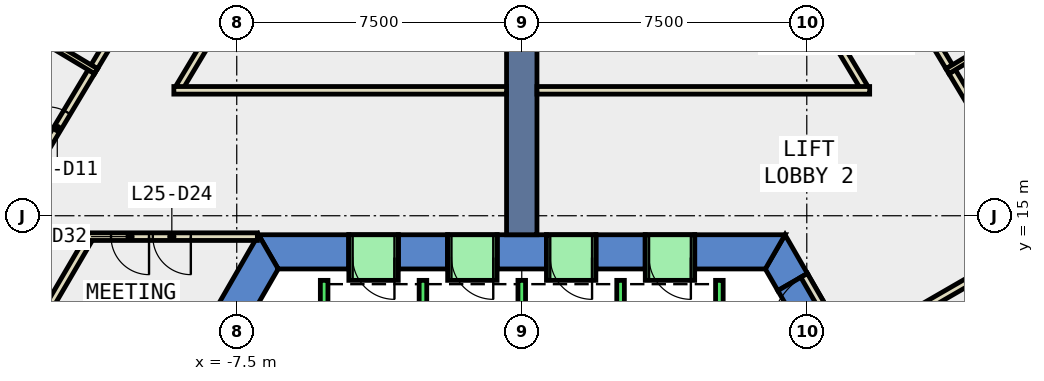
"""IFC4 building model, lengths in metres.
Left out: names, types, materials, properties, quantities, classifications, styles, units other than length and angle.
Written with IfcOpenShell. Run it as: python <this file> out.ifc"""

import sys

from ifc_helpers import new_model, si_unit, direction, frame, frame_2d, origin, place, context, subcontext, project, spatial, polyline, rectangle, outline, extrude, element, fill, save


model = new_model("IFC4")
c1 = context("Model", 3, precision=1e-05, world=origin(), true_north=direction((0.0, 1.0)))
c2 = subcontext(c1, "Body", "Model", "MODEL_VIEW")
j1 = project(units=[si_unit("LENGTHUNIT", "METRE"), si_unit("PLANEANGLEUNIT", "RADIAN")], contexts=[c1])
p1 = place(None, origin())
s1 = spatial("IfcSite", under=j1, at=p1, CompositionType="ELEMENT")
p2 = place(p1, origin())
s2 = spatial("IfcBuilding", under=s1, at=p2, CompositionType="ELEMENT")
p3 = place(p2, frame((0.0, 0.0, 116.0)))
s3 = spatial("IfcBuildingStorey", under=s2, at=p3, CompositionType="ELEMENT", Elevation=116.0)
p4 = place(p3, frame((0.0, 0.0, -0.4)))
e1 = element("IfcWall", 1, at=p4, inside=s3, PredefinedType="SHEAR", context=c2, shape_type="SweptSolid", body=[
    extrude(outline(polyline([(6.738, 13.03), (7.517, 13.48), (6.928, 14.5), (6.409, 13.6), (6.738, 13.03)])), origin(), (0.0, 0.0, 1.0), 4.2),
])
p5 = place(p3, frame((0.0, 0.0, 3.6)))
e2 = element("IfcWall", 2, at=p5, inside=s3, PredefinedType="SHEAR", context=c2, shape_type="SweptSolid", body=[
    extrude(outline(polyline([(7.517, 13.48), (6.738, 13.03), (7.738, 11.298), (8.517, 11.748), (7.517, 13.48)])), origin(), (0.0, 0.0, 1.0), 0.2),
])
p6 = place(p3, frame((0.0, 0.0, -0.4)))
e3 = element("IfcWall", 3, at=p6, inside=s3, PredefinedType="SHEAR", context=c2, shape_type="SweptSolid", body=[
    extrude(outline(polyline([(4.55, 14.5), (4.55, 13.6), (6.409, 13.6), (6.928, 14.5), (4.55, 14.5)])), origin(), (0.0, 0.0, 1.0), 4.2),
])
p7 = place(p3, frame((0.0, 0.0, -0.4)))
e4 = element("IfcWall", 4, at=p7, inside=s3, PredefinedType="SHEAR", context=c2, shape_type="SweptSolid", body=[
    extrude(outline(polyline([(1.95, 14.5), (1.95, 13.6), (3.25, 13.6), (3.25, 14.5), (1.95, 14.5)])), origin(), (0.0, 0.0, 1.0), 4.2),
])
p8 = place(p3, frame((0.0, 0.0, -0.4)))
e5 = element("IfcWall", 5, at=p8, inside=s3, PredefinedType="SHEAR", context=c2, shape_type="SweptSolid", body=[
    extrude(outline(polyline([(-0.65, 14.5), (-0.65, 13.6), (0.65, 13.6), (0.65, 14.5), (-0.65, 14.5)])), origin(), (0.0, 0.0, 1.0), 4.2),
])
p9 = place(p3, frame((0.0, 0.0, -0.4)))
e6 = element("IfcWall", 6, at=p9, inside=s3, PredefinedType="SHEAR", context=c2, shape_type="SweptSolid", body=[
    extrude(outline(polyline([(-3.25, 14.5), (-3.25, 13.6), (-1.95, 13.6), (-1.95, 14.5), (-3.25, 14.5)])), origin(), (0.0, 0.0, 1.0), 4.2),
])
p10 = place(p3, frame((0.0, 0.0, -0.4)))
e7 = element("IfcWall", 7, at=p10, inside=s3, PredefinedType="SHEAR", context=c2, shape_type="SweptSolid", body=[
    extrude(outline(polyline([(-4.55, 13.6), (-4.55, 14.5), (-6.928, 14.5), (-6.409, 13.6), (-4.55, 13.6)])), origin(), (0.0, 0.0, 1.0), 4.2),
])
p11 = place(p3, frame((0.0, 0.0, 3.6)))
e8 = element("IfcWall", 8, at=p11, inside=s3, PredefinedType="SHEAR", context=c2, shape_type="SweptSolid", body=[
    extrude(outline(polyline([(3.25, 14.5), (3.25, 13.6), (4.55, 13.6), (4.55, 14.5), (3.25, 14.5)])), origin(), (0.0, 0.0, 1.0), 0.2),
])
p12 = place(p3, frame((0.0, 0.0, 3.6)))
e9 = element("IfcWall", 9, at=p12, inside=s3, PredefinedType="SHEAR", context=c2, shape_type="SweptSolid", body=[
    extrude(outline(polyline([(0.65, 14.5), (0.65, 13.6), (1.95, 13.6), (1.95, 14.5), (0.65, 14.5)])), origin(), (0.0, 0.0, 1.0), 0.2),
])
p13 = place(p3, frame((0.0, 0.0, 3.6)))
e10 = element("IfcWall", 10, at=p13, inside=s3, PredefinedType="SHEAR", context=c2, shape_type="SweptSolid", body=[
    extrude(outline(polyline([(-1.95, 14.5), (-1.95, 13.6), (-0.65, 13.6), (-0.65, 14.5), (-1.95, 14.5)])), origin(), (0.0, 0.0, 1.0), 0.2),
])
p14 = place(p3, frame((0.0, 0.0, 3.6)))
e11 = element("IfcWall", 11, at=p14, inside=s3, PredefinedType="SHEAR", context=c2, shape_type="SweptSolid", body=[
    extrude(outline(polyline([(-4.55, 14.5), (-4.55, 13.6), (-3.25, 13.6), (-3.25, 14.5), (-4.55, 14.5)])), origin(), (0.0, 0.0, 1.0), 0.2),
])
p15 = place(p3, frame((0.0, 0.0, -0.4)))
e12 = element("IfcWall", 12, at=p15, inside=s3, PredefinedType="SHEAR", context=c2, shape_type="SweptSolid", body=[
    extrude(outline(polyline([(-12.267, 5.252), (-11.488, 4.802), (-6.409, 13.6), (-6.928, 14.5), (-12.267, 5.252)])), origin(), (0.0, 0.0, 1.0), 4.2),
])
p16 = place(p3, frame((0.0, 14.5, -0.4), z_axis=(0.0, 0.0, 1.0), x_axis=(0.0, 1.0, 0.0)))
e13 = element("IfcWall", 13, at=p16, inside=s3, PredefinedType="SHEAR", context=c2, shape_type="SweptSolid", body=[
    extrude(rectangle(XDim=9.0, YDim=0.8, at=frame_2d((4.5, 0.0))), origin(), (0.0, 0.0, 1.0), 4.2),
])
p17 = place(p3, frame((-11.409, 14.364, 0.0), z_axis=(0.0, 0.0, 1.0), x_axis=(-0.504846343003, -0.863209227219, 0.0)))
e14 = element("IfcWall", 14, at=p17, inside=s3, PredefinedType="PARTITIONING", context=c2, shape_type="SweptSolid", body=[
    extrude(rectangle(XDim=2.785, YDim=0.2, at=frame_2d((1.393, 0.0))), origin(), (0.0, 0.0, 1.0), 3.8),
])
p18 = place(p3, frame((11.888, 13.348, 0.0), z_axis=(0.0, 0.0, 1.0), x_axis=(-0.865959227195, -0.500114603702, 0.0)))
e15 = element("IfcWall", 15, at=p18, inside=s3, PredefinedType="PARTITIONING", context=c2, shape_type="SweptSolid", body=[
    extrude(rectangle(XDim=3.269, YDim=0.2, at=frame_2d((1.635, 0.0))), origin(), (0.0, 0.0, 1.0), 3.8),
])
for number, where, z_axis, x_axis in (
    (16, (9.003, 18.386, 0.0), (0.0, 0.0, 1.0), (-0.514, 0.858, 0.0)),
    (17, (-7.576, 20.768, 0.0), (0.0, 0.0, 1.0), (-0.514, -0.858, 0.0)),
):
    element("IfcWall", number, at=place(p3, frame(where, z_axis=z_axis, x_axis=x_axis)), inside=s3, PredefinedType="PARTITIONING", context=c2, shape_type="SweptSolid", body=[
        extrude(rectangle(XDim=2.777, YDim=0.2, at=frame_2d((1.388, 0.0))), origin(), (0.0, 0.0, 1.0), 3.8),
    ])
p19 = place(p3, frame((11.326, 18.79, 0.0), z_axis=(0.0, 0.0, 1.0), x_axis=(0.514155958966, -0.857696712049, 0.0)))
e18 = element("IfcWall", 18, at=p19, inside=s3, PredefinedType="PARTITIONING", context=c2, shape_type="SweptSolid", body=[
    extrude(rectangle(XDim=3.487, YDim=0.2, at=frame_2d((1.744, 0.0))), origin(), (0.0, 0.0, 1.0), 3.8),
])
for number, where, z_axis, x_axis in (
    (19, (9.457, 21.909, 0.0), (0.0, 0.0, 1.0), (0.514, -0.858, 0.0)),
    (20, (-11.249, 18.918, 0.0), (0.0, 0.0, 1.0), (0.514, 0.858, 0.0)),
):
    element("IfcWall", number, at=place(p3, frame(where, z_axis=z_axis, x_axis=x_axis)), inside=s3, PredefinedType="PARTITIONING", context=c2, shape_type="SweptSolid", body=[
        extrude(rectangle(XDim=3.487, YDim=0.2, at=frame_2d((1.743, 0.0))), origin(), (0.0, 0.0, 1.0), 3.8),
    ])
p20 = place(p3, frame((-13.119, 15.799, 0.0), z_axis=(0.0, 0.0, 1.0), x_axis=(0.514155958966, 0.857696712049, 0.0)))
e21 = element("IfcWall", 21, at=p20, inside=s3, PredefinedType="PARTITIONING", context=c2, shape_type="SweptSolid", body=[
    extrude(rectangle(XDim=3.487, YDim=0.2, at=frame_2d((1.744, 0.0))), origin(), (0.0, 0.0, 1.0), 3.8),
])
p21 = place(p20, frame((1.244, 0.0, 0.0)))
e22 = element("IfcOpeningElement", 22, at=p21, cuts=e21, PredefinedType="OPENING", context=c2, shape_type="SweptSolid", body=[
    extrude(rectangle(XDim=1.0, YDim=2.1, at=frame_2d((0.5, 1.05))), frame((0.0, 0.11, 0.0), z_axis=(0.0, -1.0, 0.0), x_axis=(1.0, 0.0, 0.0)), (0.0, 0.0, 1.0), 0.22),
])
p22 = place(p3, frame((-6.957, 14.45, 0.0), z_axis=(0.0, 0.0, 1.0), x_axis=(-1.0, 0.0, 0.0)))
e23 = element("IfcWall", 23, at=p22, inside=s3, PredefinedType="PARTITIONING", context=c2, shape_type="SweptSolid", body=[
    extrude(rectangle(XDim=4.502, YDim=0.2, at=frame_2d((2.251, 0.0))), origin(), (0.0, 0.0, 1.0), 3.8),
])
p23 = place(p22, frame((1.751, 0.0, 0.0)))
e24 = element("IfcOpeningElement", 24, at=p23, cuts=e23, PredefinedType="OPENING", context=c2, shape_type="SweptSolid", body=[
    extrude(rectangle(XDim=1.0, YDim=2.1, at=frame_2d((0.5, 1.05))), frame((0.0, 0.11, 0.0), z_axis=(0.0, -1.0, 0.0), x_axis=(1.0, 0.0, 0.0)), (0.0, 0.0, 1.0), 0.22),
])
p24 = place(p22, frame((2.851, 0.0, 0.0)))
e25 = element("IfcOpeningElement", 25, at=p24, cuts=e23, PredefinedType="OPENING", context=c2, shape_type="SweptSolid", body=[
    extrude(rectangle(XDim=1.0, YDim=2.1, at=frame_2d((0.5, 1.05))), frame((0.0, 0.11, 0.0), z_axis=(0.0, -1.0, 0.0), x_axis=(1.0, 0.0, 0.0)), (0.0, 0.0, 1.0), 0.22),
])
for number, where, z_axis, x_axis in (
    (26, (0.4, 18.3, 0.0), (0.0, 0.0, 1.0), (1.0, 0.0, 0.0)),
    (27, (-9.155, 18.3, 0.0), (0.0, 0.0, 1.0), (1.0, 0.0, 0.0)),
):
    element("IfcWall", number, at=place(p3, frame(where, z_axis=z_axis, x_axis=x_axis)), inside=s3, PredefinedType="PARTITIONING", context=c2, shape_type="SweptSolid", body=[
        extrude(rectangle(XDim=8.755, YDim=0.2, at=frame_2d((4.377, 0.0))), origin(), (0.0, 0.0, 1.0), 3.8),
    ])
for number, where, z_axis, x_axis in (
    (28, (11.202, 18.803, 0.0), (0.0, 0.0, 1.0), (0.858, 0.514, 0.0)),
    (29, (-11.202, 18.803, 0.0), (0.0, 0.0, 1.0), (-0.858, 0.514, 0.0)),
):
    element("IfcWall", number, at=place(p3, frame(where, z_axis=z_axis, x_axis=x_axis)), inside=s3, PredefinedType="PARTITIONING", context=c2, shape_type="SweptSolid", body=[
        extrude(rectangle(XDim=7.7, YDim=0.15, at=frame_2d((3.85, 0.0))), origin(), (0.0, 0.0, 1.0), 3.8),
    ])
p25 = place(p3, frame((8.43, 11.698, 0.0), z_axis=(0.0, 0.0, 1.0), x_axis=(-0.50002537861, 0.866010750942, 0.0)))
e30 = element("IfcWall", 30, at=p25, inside=s3, PredefinedType="PARTITIONING", context=c2, shape_type="SweptSolid", body=[
    extrude(rectangle(XDim=2.0, YDim=0.2, at=frame_2d((1.0, 0.0))), origin(), (0.0, 0.0, 1.0), 2.4),
])
p26 = place(p25, frame((0.19, 0.0, 0.0)))
e31 = element("IfcOpeningElement", 31, at=p26, cuts=e30, PredefinedType="OPENING", context=c2, shape_type="SweptSolid", body=[
    extrude(rectangle(XDim=1.8, YDim=2.1, at=frame_2d((0.9, 1.05))), frame((0.0, 0.11, 0.0), z_axis=(0.0, -1.0, 0.0), x_axis=(1.0, 0.0, 0.0)), (0.0, 0.0, 1.0), 0.22),
])
for number, where, z_axis, x_axis in (
    (32, (5.2, 10.8, 0.0), (0.0, 0.0, 1.0), (0.0, 1.0, 0.0)),
    (33, (2.6, 10.8, 0.0), (0.0, 0.0, 1.0), (0.0, 1.0, 0.0)),
    (34, (0.0, 10.8, 0.0), (0.0, 0.0, 1.0), (0.0, 1.0, 0.0)),
    (35, (-2.6, 10.8, 0.0), (0.0, 0.0, 1.0), (0.0, 1.0, 0.0)),
    (36, (-5.2, 10.8, 0.0), (0.0, 0.0, 1.0), (0.0, 1.0, 0.0)),
):
    element("IfcWall", number, at=place(p3, frame(where, z_axis=z_axis, x_axis=x_axis)), inside=s3, PredefinedType="STANDARD", context=c2, shape_type="SweptSolid", body=[
        extrude(rectangle(XDim=2.5, YDim=0.2, at=frame_2d((1.25, 0.0))), origin(), (0.0, 0.0, 1.0), 3.8),
    ])
p27 = place(p3, frame((4.55, 13.9, 0.0), z_axis=(0.0, 0.0, 1.0), x_axis=(-1.0, 0.0, 0.0)))
e37 = element("IfcWall", 37, at=p27, inside=s3, PredefinedType="STANDARD", context=c2, shape_type="SweptSolid", body=[
    extrude(rectangle(XDim=1.3, YDim=1.2, at=frame_2d((0.65, 0.0))), origin(), (0.0, 0.0, 1.0), 2.4),
])
p28 = place(p27, frame((0.1, 0.0, 0.0)))
e38 = element("IfcOpeningElement", 38, at=p28, cuts=e37, PredefinedType="OPENING", context=c2, shape_type="SweptSolid", body=[
    extrude(rectangle(XDim=1.1, YDim=2.3, at=frame_2d((0.55, 1.15))), frame((0.0, 0.61, 0.0), z_axis=(0.0, -1.0, 0.0), x_axis=(1.0, 0.0, 0.0)), (0.0, 0.0, 1.0), 1.22),
])
p29 = place(p3, frame((1.95, 13.9, 0.0), z_axis=(0.0, 0.0, 1.0), x_axis=(-1.0, 0.0, 0.0)))
e39 = element("IfcWall", 39, at=p29, inside=s3, PredefinedType="STANDARD", context=c2, shape_type="SweptSolid", body=[
    extrude(rectangle(XDim=1.3, YDim=1.2, at=frame_2d((0.65, 0.0))), origin(), (0.0, 0.0, 1.0), 2.4),
])
p30 = place(p29, frame((0.1, 0.0, 0.0)))
e40 = element("IfcOpeningElement", 40, at=p30, cuts=e39, PredefinedType="OPENING", context=c2, shape_type="SweptSolid", body=[
    extrude(rectangle(XDim=1.1, YDim=2.3, at=frame_2d((0.55, 1.15))), frame((0.0, 0.61, 0.0), z_axis=(0.0, -1.0, 0.0), x_axis=(1.0, 0.0, 0.0)), (0.0, 0.0, 1.0), 1.22),
])
p31 = place(p3, frame((-0.65, 13.9, 0.0), z_axis=(0.0, 0.0, 1.0), x_axis=(-1.0, 0.0, 0.0)))
e41 = element("IfcWall", 41, at=p31, inside=s3, PredefinedType="STANDARD", context=c2, shape_type="SweptSolid", body=[
    extrude(rectangle(XDim=1.3, YDim=1.2, at=frame_2d((0.65, 0.0))), origin(), (0.0, 0.0, 1.0), 2.4),
])
p32 = place(p31, frame((0.1, 0.0, 0.0)))
e42 = element("IfcOpeningElement", 42, at=p32, cuts=e41, PredefinedType="OPENING", context=c2, shape_type="SweptSolid", body=[
    extrude(rectangle(XDim=1.1, YDim=2.3, at=frame_2d((0.55, 1.15))), frame((0.0, 0.61, 0.0), z_axis=(0.0, -1.0, 0.0), x_axis=(1.0, 0.0, 0.0)), (0.0, 0.0, 1.0), 1.22),
])
p33 = place(p3, frame((-3.25, 13.9, 0.0), z_axis=(0.0, 0.0, 1.0), x_axis=(-1.0, 0.0, 0.0)))
e43 = element("IfcWall", 43, at=p33, inside=s3, PredefinedType="STANDARD", context=c2, shape_type="SweptSolid", body=[
    extrude(rectangle(XDim=1.3, YDim=1.2, at=frame_2d((0.65, 0.0))), origin(), (0.0, 0.0, 1.0), 2.4),
])
p34 = place(p33, frame((0.1, 0.0, 0.0)))
e44 = element("IfcOpeningElement", 44, at=p34, cuts=e43, PredefinedType="OPENING", context=c2, shape_type="SweptSolid", body=[
    extrude(rectangle(XDim=1.1, YDim=2.3, at=frame_2d((0.55, 1.15))), frame((0.0, 0.61, 0.0), z_axis=(0.0, -1.0, 0.0), x_axis=(1.0, 0.0, 0.0)), (0.0, 0.0, 1.0), 1.22),
])
p35 = place(p21, origin())
e45 = element("IfcDoor", 45, at=p35, inside=s3, OperationType="SINGLE_SWING_LEFT", PredefinedType="DOOR", context=c2, shape_type="SweptSolid", body=[
    extrude(rectangle(XDim=1.0, YDim=2.1, at=frame_2d((0.5, 1.05))), frame((0.0, 0.025, 0.0), z_axis=(0.0, -1.0, 0.0), x_axis=(1.0, 0.0, 0.0)), (0.0, 0.0, 1.0), 0.05),
])
fill(e22, e45)
p36 = place(p23, origin())
e46 = element("IfcDoor", 46, at=p36, inside=s3, OperationType="SINGLE_SWING_LEFT", PredefinedType="DOOR", context=c2, shape_type="SweptSolid", body=[
    extrude(rectangle(XDim=1.0, YDim=2.1, at=frame_2d((0.5, 1.05))), frame((0.0, 0.025, 0.0), z_axis=(0.0, -1.0, 0.0), x_axis=(1.0, 0.0, 0.0)), (0.0, 0.0, 1.0), 0.05),
])
fill(e24, e46)
p37 = place(p24, origin())
e47 = element("IfcDoor", 47, at=p37, inside=s3, OperationType="SINGLE_SWING_RIGHT", PredefinedType="DOOR", context=c2, shape_type="SweptSolid", body=[
    extrude(rectangle(XDim=1.0, YDim=2.1, at=frame_2d((0.5, 1.05))), frame((0.0, 0.025, 0.0), z_axis=(0.0, -1.0, 0.0), x_axis=(1.0, 0.0, 0.0)), (0.0, 0.0, 1.0), 0.05),
])
fill(e25, e47)
p38 = place(p26, origin())
e48 = element("IfcDoor", 48, at=p38, inside=s3, OperationType="DOUBLE_DOOR_SINGLE_SWING", PredefinedType="DOOR", context=c2, shape_type="SweptSolid", body=[
    extrude(rectangle(XDim=1.8, YDim=2.1, at=frame_2d((0.9, 1.05))), frame((0.0, 0.025, 0.0), z_axis=(0.0, -1.0, 0.0), x_axis=(1.0, 0.0, 0.0)), (0.0, 0.0, 1.0), 0.05),
])
fill(e31, e48)
p39 = place(p28, origin())
e49 = element("IfcDoor", 49, at=p39, inside=s3, OperationType="SLIDING_TO_LEFT", PredefinedType="DOOR", context=c2, shape_type="SweptSolid", body=[
    extrude(rectangle(XDim=1.1, YDim=2.3, at=frame_2d((0.55, 1.15))), frame((0.0, 0.025, 0.0), z_axis=(0.0, -1.0, 0.0), x_axis=(1.0, 0.0, 0.0)), (0.0, 0.0, 1.0), 0.05),
])
fill(e38, e49)
p40 = place(p30, origin())
e50 = element("IfcDoor", 50, at=p40, inside=s3, OperationType="SLIDING_TO_LEFT", PredefinedType="DOOR", context=c2, shape_type="SweptSolid", body=[
    extrude(rectangle(XDim=1.1, YDim=2.3, at=frame_2d((0.55, 1.15))), frame((0.0, 0.025, 0.0), z_axis=(0.0, -1.0, 0.0), x_axis=(1.0, 0.0, 0.0)), (0.0, 0.0, 1.0), 0.05),
])
fill(e40, e50)
p41 = place(p32, origin())
e51 = element("IfcDoor", 51, at=p41, inside=s3, OperationType="SLIDING_TO_LEFT", PredefinedType="DOOR", context=c2, shape_type="SweptSolid", body=[
    extrude(rectangle(XDim=1.1, YDim=2.3, at=frame_2d((0.55, 1.15))), frame((0.0, 0.025, 0.0), z_axis=(0.0, -1.0, 0.0), x_axis=(1.0, 0.0, 0.0)), (0.0, 0.0, 1.0), 0.05),
])
fill(e42, e51)
p42 = place(p34, origin())
e52 = element("IfcDoor", 52, at=p42, inside=s3, OperationType="SLIDING_TO_LEFT", PredefinedType="DOOR", context=c2, shape_type="SweptSolid", body=[
    extrude(rectangle(XDim=1.1, YDim=2.3, at=frame_2d((0.55, 1.15))), frame((0.0, 0.025, 0.0), z_axis=(0.0, -1.0, 0.0), x_axis=(1.0, 0.0, 0.0)), (0.0, 0.0, 1.0), 0.05),
])
fill(e44, e52)
save(model, sys.argv[1])
